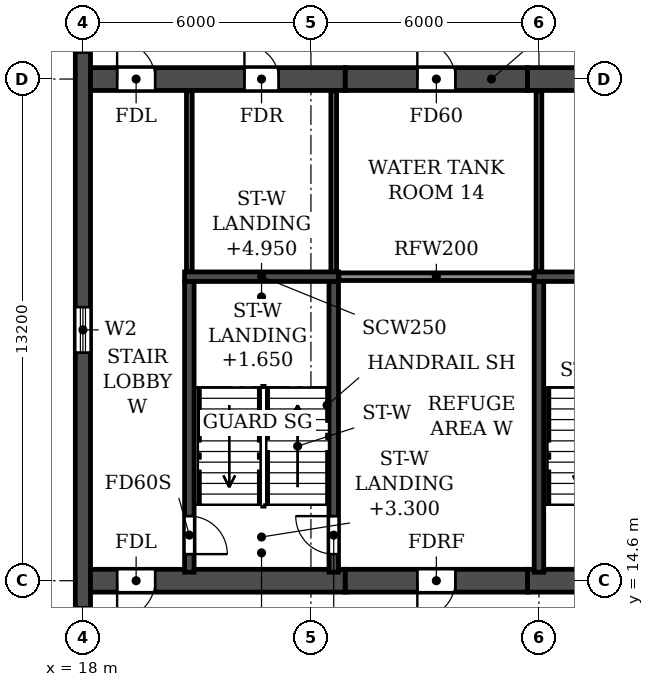
"""IFC4 building model, lengths in metres.
Left out: names, types, materials, properties, quantities, classifications, styles, units other than length and angle.
Written with IfcOpenShell. Run it as: python <this file> out.ifc"""

import sys

from ifc_helpers import new_model, si_unit, direction, frame, frame_2d, origin, place, context, subcontext, project, spatial, rectangle, extrude, element, fill, save


model = new_model("IFC4")
c1 = context("Model", 3, precision=1e-05, world=origin(), true_north=direction((0.0, 1.0)))
c2 = subcontext(c1, "Body", "Model", "MODEL_VIEW")
j1 = project(units=[si_unit("LENGTHUNIT", "METRE"), si_unit("PLANEANGLEUNIT", "RADIAN")], contexts=[c1])
p1 = place(None, origin())
s1 = spatial("IfcSite", under=j1, at=p1, CompositionType="ELEMENT")
p2 = place(p1, origin())
s2 = spatial("IfcBuilding", under=s1, at=p2, CompositionType="ELEMENT")
p3 = place(p2, frame((0.0, 0.0, 165.3)))
s3 = spatial("IfcBuildingStorey", under=s2, at=p3, CompositionType="ELEMENT", Elevation=165.3)
p4 = place(p3, frame((18.0, 4.683, 0.0), z_axis=(0.0, 0.0, 1.0), x_axis=(0.0, 1.0, 0.0)))
e1 = element("IfcWall", 1, at=p4, inside=s3, PredefinedType="SHEAR", context=c2, shape_type="SweptSolid", body=[
    extrude(rectangle(XDim=33.034, YDim=0.4, at=frame_2d((16.517, 0.0))), origin(), (0.0, 0.0, 1.0), 6.38),
])
p5 = place(p4, frame((23.817, 0.0, 0.9)))
e2 = element("IfcOpeningElement", 2, at=p5, cuts=e1, PredefinedType="OPENING", context=c2, shape_type="SweptSolid", body=[
    extrude(rectangle(XDim=1.2, YDim=1.5, at=frame_2d((0.6, 0.75))), frame((0.0, 0.21, 0.0), z_axis=(0.0, -1.0, 0.0), x_axis=(1.0, 0.0, 0.0)), (0.0, 0.0, 1.0), 0.42),
])
p6 = place(p4, frame((8.017, 0.0, 0.9)))
e3 = element("IfcOpeningElement", 3, at=p6, cuts=e1, PredefinedType="OPENING", context=c2, shape_type="SweptSolid", body=[
    extrude(rectangle(XDim=1.2, YDim=1.5, at=frame_2d((0.6, 0.75))), frame((0.0, 0.21, 0.0), z_axis=(0.0, -1.0, 0.0), x_axis=(1.0, 0.0, 0.0)), (0.0, 0.0, 1.0), 0.42),
])
p7 = place(p4, frame((15.917, 0.0, 0.9)))
e4 = element("IfcOpeningElement", 4, at=p7, cuts=e1, PredefinedType="OPENING", context=c2, shape_type="SweptSolid", body=[
    extrude(rectangle(XDim=1.2, YDim=1.5, at=frame_2d((0.6, 0.75))), frame((0.0, 0.21, 0.0), z_axis=(0.0, -1.0, 0.0), x_axis=(1.0, 0.0, 0.0)), (0.0, 0.0, 1.0), 0.42),
])
p8 = place(p3, frame((24.9, 14.6, 0.0), z_axis=(0.0, 0.0, 1.0), x_axis=(1.0, 0.0, 0.0)))
e5 = element("IfcWall", 5, at=p8, inside=s3, PredefinedType="SHEAR", context=c2, shape_type="SweptSolid", body=[
    extrude(rectangle(XDim=4.8, YDim=0.6, at=frame_2d((2.4, 0.0))), origin(), (0.0, 0.0, 1.0), 6.38),
])
p9 = place(p8, frame((1.9, 0.0, 0.0)))
e6 = element("IfcOpeningElement", 6, at=p9, cuts=e5, PredefinedType="OPENING", context=c2, shape_type="SweptSolid", body=[
    extrude(rectangle(XDim=1.0, YDim=2.1, at=frame_2d((0.5, 1.05))), frame((0.0, 0.31, 0.0), z_axis=(0.0, -1.0, 0.0), x_axis=(1.0, 0.0, 0.0)), (0.0, 0.0, 1.0), 0.62),
])
p10 = place(p3, frame((24.9, 27.8, 0.0), z_axis=(0.0, 0.0, 1.0), x_axis=(1.0, 0.0, 0.0)))
e7 = element("IfcWall", 7, at=p10, inside=s3, PredefinedType="SHEAR", context=c2, shape_type="SweptSolid", body=[
    extrude(rectangle(XDim=4.8, YDim=0.6, at=frame_2d((2.4, 0.0))), origin(), (0.0, 0.0, 1.0), 6.38),
])
p11 = place(p10, frame((1.9, 0.0, 0.0)))
e8 = element("IfcOpeningElement", 8, at=p11, cuts=e7, PredefinedType="OPENING", context=c2, shape_type="SweptSolid", body=[
    extrude(rectangle(XDim=1.0, YDim=2.1, at=frame_2d((0.5, 1.05))), frame((0.0, 0.31, 0.0), z_axis=(0.0, -1.0, 0.0), x_axis=(1.0, 0.0, 0.0)), (0.0, 0.0, 1.0), 0.62),
])
p12 = place(p3, frame((18.2, 14.6, 0.0), z_axis=(0.0, 0.0, 1.0), x_axis=(1.0, 0.0, 0.0)))
e9 = element("IfcWall", 9, at=p12, inside=s3, PredefinedType="SOLIDWALL", context=c2, shape_type="SweptSolid", body=[
    extrude(rectangle(XDim=6.7, YDim=0.6, at=frame_2d((3.35, 0.0))), origin(), (0.0, 0.0, 1.0), 6.38),
])
p13 = place(p12, frame((0.7, 0.0, 0.0)))
e10 = element("IfcOpeningElement", 10, at=p13, cuts=e9, PredefinedType="OPENING", context=c2, shape_type="SweptSolid", body=[
    extrude(rectangle(XDim=1.0, YDim=2.1, at=frame_2d((0.5, 1.05))), frame((0.0, 0.31, 0.0), z_axis=(0.0, -1.0, 0.0), x_axis=(1.0, 0.0, 0.0)), (0.0, 0.0, 1.0), 0.62),
])
p14 = place(p3, frame((29.7, 14.6, 0.0), z_axis=(0.0, 0.0, 1.0), x_axis=(1.0, 0.0, 0.0)))
e11 = element("IfcWall", 11, at=p14, inside=s3, PredefinedType="SOLIDWALL", context=c2, shape_type="SweptSolid", body=[
    extrude(rectangle(XDim=42.6, YDim=0.6, at=frame_2d((21.3, 0.0))), origin(), (0.0, 0.0, 1.0), 6.38),
])
p15 = place(p14, frame((1.7, 0.0, 0.0)))
e12 = element("IfcOpeningElement", 12, at=p15, cuts=e11, PredefinedType="OPENING", context=c2, shape_type="SweptSolid", body=[
    extrude(rectangle(XDim=1.0, YDim=2.1, at=frame_2d((0.5, 1.05))), frame((0.0, 0.31, 0.0), z_axis=(0.0, -1.0, 0.0), x_axis=(1.0, 0.0, 0.0)), (0.0, 0.0, 1.0), 0.62),
])
p16 = place(p14, frame((13.0, 0.0, 0.0)))
e13 = element("IfcOpeningElement", 13, at=p16, cuts=e11, PredefinedType="OPENING", context=c2, shape_type="SweptSolid", body=[
    extrude(rectangle(XDim=1.0, YDim=2.1, at=frame_2d((0.5, 1.05))), frame((0.0, 0.31, 0.0), z_axis=(0.0, -1.0, 0.0), x_axis=(1.0, 0.0, 0.0)), (0.0, 0.0, 1.0), 0.62),
])
p17 = place(p14, frame((16.9, 0.0, 0.0)))
e14 = element("IfcOpeningElement", 14, at=p17, cuts=e11, PredefinedType="OPENING", context=c2, shape_type="SweptSolid", body=[
    extrude(rectangle(XDim=1.0, YDim=2.1, at=frame_2d((0.5, 1.05))), frame((0.0, 0.31, 0.0), z_axis=(0.0, -1.0, 0.0), x_axis=(1.0, 0.0, 0.0)), (0.0, 0.0, 1.0), 0.62),
])
p18 = place(p14, frame((20.8, 0.0, 0.0)))
e15 = element("IfcOpeningElement", 15, at=p18, cuts=e11, PredefinedType="OPENING", context=c2, shape_type="SweptSolid", body=[
    extrude(rectangle(XDim=1.0, YDim=2.1, at=frame_2d((0.5, 1.05))), frame((0.0, 0.31, 0.0), z_axis=(0.0, -1.0, 0.0), x_axis=(1.0, 0.0, 0.0)), (0.0, 0.0, 1.0), 0.62),
])
p19 = place(p14, frame((24.7, 0.0, 0.0)))
e16 = element("IfcOpeningElement", 16, at=p19, cuts=e11, PredefinedType="OPENING", context=c2, shape_type="SweptSolid", body=[
    extrude(rectangle(XDim=1.0, YDim=2.1, at=frame_2d((0.5, 1.05))), frame((0.0, 0.31, 0.0), z_axis=(0.0, -1.0, 0.0), x_axis=(1.0, 0.0, 0.0)), (0.0, 0.0, 1.0), 0.62),
])
p20 = place(p14, frame((28.6, 0.0, 0.0)))
e17 = element("IfcOpeningElement", 17, at=p20, cuts=e11, PredefinedType="OPENING", context=c2, shape_type="SweptSolid", body=[
    extrude(rectangle(XDim=1.0, YDim=2.1, at=frame_2d((0.5, 1.05))), frame((0.0, 0.31, 0.0), z_axis=(0.0, -1.0, 0.0), x_axis=(1.0, 0.0, 0.0)), (0.0, 0.0, 1.0), 0.62),
])
p21 = place(p14, frame((39.9, 0.0, 0.0)))
e18 = element("IfcOpeningElement", 18, at=p21, cuts=e11, PredefinedType="OPENING", context=c2, shape_type="SweptSolid", body=[
    extrude(rectangle(XDim=1.0, YDim=2.1, at=frame_2d((0.5, 1.05))), frame((0.0, 0.31, 0.0), z_axis=(0.0, -1.0, 0.0), x_axis=(1.0, 0.0, 0.0)), (0.0, 0.0, 1.0), 0.62),
])
p22 = place(p3, frame((18.2, 27.8, 0.0), z_axis=(0.0, 0.0, 1.0), x_axis=(1.0, 0.0, 0.0)))
e19 = element("IfcWall", 19, at=p22, inside=s3, PredefinedType="SOLIDWALL", context=c2, shape_type="SweptSolid", body=[
    extrude(rectangle(XDim=6.7, YDim=0.6, at=frame_2d((3.35, 0.0))), origin(), (0.0, 0.0, 1.0), 6.38),
])
p23 = place(p22, frame((0.7, 0.0, 0.0)))
e20 = element("IfcOpeningElement", 20, at=p23, cuts=e19, PredefinedType="OPENING", context=c2, shape_type="SweptSolid", body=[
    extrude(rectangle(XDim=1.0, YDim=2.1, at=frame_2d((0.5, 1.05))), frame((0.0, 0.31, 0.0), z_axis=(0.0, -1.0, 0.0), x_axis=(1.0, 0.0, 0.0)), (0.0, 0.0, 1.0), 0.62),
])
p24 = place(p22, frame((4.05, 0.0, 0.0)))
e21 = element("IfcOpeningElement", 21, at=p24, cuts=e19, PredefinedType="OPENING", context=c2, shape_type="SweptSolid", body=[
    extrude(rectangle(XDim=0.9, YDim=2.1, at=frame_2d((0.45, 1.05))), frame((0.0, 0.31, 0.0), z_axis=(0.0, -1.0, 0.0), x_axis=(1.0, 0.0, 0.0)), (0.0, 0.0, 1.0), 0.62),
])
p25 = place(p3, frame((29.7, 27.8, 0.0), z_axis=(0.0, 0.0, 1.0), x_axis=(1.0, 0.0, 0.0)))
e22 = element("IfcWall", 22, at=p25, inside=s3, PredefinedType="SOLIDWALL", context=c2, shape_type="SweptSolid", body=[
    extrude(rectangle(XDim=42.6, YDim=0.6, at=frame_2d((21.3, 0.0))), origin(), (0.0, 0.0, 1.0), 6.38),
])
p26 = place(p25, frame((1.75, 0.0, 0.0)))
e23 = element("IfcOpeningElement", 23, at=p26, cuts=e22, PredefinedType="OPENING", context=c2, shape_type="SweptSolid", body=[
    extrude(rectangle(XDim=0.9, YDim=2.1, at=frame_2d((0.45, 1.05))), frame((0.0, 0.31, 0.0), z_axis=(0.0, -1.0, 0.0), x_axis=(1.0, 0.0, 0.0)), (0.0, 0.0, 1.0), 0.62),
])
p27 = place(p25, frame((4.9, 0.0, 0.0)))
e24 = element("IfcOpeningElement", 24, at=p27, cuts=e22, PredefinedType="OPENING", context=c2, shape_type="SweptSolid", body=[
    extrude(rectangle(XDim=1.0, YDim=2.1, at=frame_2d((0.5, 1.05))), frame((0.0, 0.31, 0.0), z_axis=(0.0, -1.0, 0.0), x_axis=(1.0, 0.0, 0.0)), (0.0, 0.0, 1.0), 0.62),
])
p28 = place(p25, frame((10.1, 0.0, 0.0)))
e25 = element("IfcOpeningElement", 25, at=p28, cuts=e22, PredefinedType="OPENING", context=c2, shape_type="SweptSolid", body=[
    extrude(rectangle(XDim=1.0, YDim=2.1, at=frame_2d((0.5, 1.05))), frame((0.0, 0.31, 0.0), z_axis=(0.0, -1.0, 0.0), x_axis=(1.0, 0.0, 0.0)), (0.0, 0.0, 1.0), 0.62),
])
p29 = place(p25, frame((17.9, 0.0, 0.0)))
e26 = element("IfcOpeningElement", 26, at=p29, cuts=e22, PredefinedType="OPENING", context=c2, shape_type="SweptSolid", body=[
    extrude(rectangle(XDim=1.0, YDim=2.1, at=frame_2d((0.5, 1.05))), frame((0.0, 0.31, 0.0), z_axis=(0.0, -1.0, 0.0), x_axis=(1.0, 0.0, 0.0)), (0.0, 0.0, 1.0), 0.62),
])
p30 = place(p25, frame((20.8, 0.0, 0.0)))
e27 = element("IfcOpeningElement", 27, at=p30, cuts=e22, PredefinedType="OPENING", context=c2, shape_type="SweptSolid", body=[
    extrude(rectangle(XDim=1.0, YDim=2.1, at=frame_2d((0.5, 1.05))), frame((0.0, 0.31, 0.0), z_axis=(0.0, -1.0, 0.0), x_axis=(1.0, 0.0, 0.0)), (0.0, 0.0, 1.0), 0.62),
])
p31 = place(p25, frame((23.7, 0.0, 0.0)))
e28 = element("IfcOpeningElement", 28, at=p31, cuts=e22, PredefinedType="OPENING", context=c2, shape_type="SweptSolid", body=[
    extrude(rectangle(XDim=1.0, YDim=2.1, at=frame_2d((0.5, 1.05))), frame((0.0, 0.31, 0.0), z_axis=(0.0, -1.0, 0.0), x_axis=(1.0, 0.0, 0.0)), (0.0, 0.0, 1.0), 0.62),
])
p32 = place(p25, frame((26.3, 0.0, 0.0)))
e29 = element("IfcOpeningElement", 29, at=p32, cuts=e22, PredefinedType="OPENING", context=c2, shape_type="SweptSolid", body=[
    extrude(rectangle(XDim=1.0, YDim=2.1, at=frame_2d((0.5, 1.05))), frame((0.0, 0.31, 0.0), z_axis=(0.0, -1.0, 0.0), x_axis=(1.0, 0.0, 0.0)), (0.0, 0.0, 1.0), 0.62),
])
p33 = place(p25, frame((28.9, 0.0, 0.0)))
e30 = element("IfcOpeningElement", 30, at=p33, cuts=e22, PredefinedType="OPENING", context=c2, shape_type="SweptSolid", body=[
    extrude(rectangle(XDim=1.0, YDim=2.1, at=frame_2d((0.5, 1.05))), frame((0.0, 0.31, 0.0), z_axis=(0.0, -1.0, 0.0), x_axis=(1.0, 0.0, 0.0)), (0.0, 0.0, 1.0), 0.62),
])
p34 = place(p25, frame((31.5, 0.0, 0.0)))
e31 = element("IfcOpeningElement", 31, at=p34, cuts=e22, PredefinedType="OPENING", context=c2, shape_type="SweptSolid", body=[
    extrude(rectangle(XDim=1.0, YDim=2.1, at=frame_2d((0.5, 1.05))), frame((0.0, 0.31, 0.0), z_axis=(0.0, -1.0, 0.0), x_axis=(1.0, 0.0, 0.0)), (0.0, 0.0, 1.0), 0.62),
])
p35 = place(p25, frame((34.1, 0.0, 0.0)))
e32 = element("IfcOpeningElement", 32, at=p35, cuts=e22, PredefinedType="OPENING", context=c2, shape_type="SweptSolid", body=[
    extrude(rectangle(XDim=1.0, YDim=2.1, at=frame_2d((0.5, 1.05))), frame((0.0, 0.31, 0.0), z_axis=(0.0, -1.0, 0.0), x_axis=(1.0, 0.0, 0.0)), (0.0, 0.0, 1.0), 0.62),
])
p36 = place(p25, frame((36.7, 0.0, 0.0)))
e33 = element("IfcOpeningElement", 33, at=p36, cuts=e22, PredefinedType="OPENING", context=c2, shape_type="SweptSolid", body=[
    extrude(rectangle(XDim=1.0, YDim=2.1, at=frame_2d((0.5, 1.05))), frame((0.0, 0.31, 0.0), z_axis=(0.0, -1.0, 0.0), x_axis=(1.0, 0.0, 0.0)), (0.0, 0.0, 1.0), 0.62),
])
p37 = place(p25, frame((39.95, 0.0, 0.0)))
e34 = element("IfcOpeningElement", 34, at=p37, cuts=e22, PredefinedType="OPENING", context=c2, shape_type="SweptSolid", body=[
    extrude(rectangle(XDim=0.9, YDim=2.1, at=frame_2d((0.45, 1.05))), frame((0.0, 0.31, 0.0), z_axis=(0.0, -1.0, 0.0), x_axis=(1.0, 0.0, 0.0)), (0.0, 0.0, 1.0), 0.62),
])
p38 = place(p3, frame((30.0, 14.825, 0.0), z_axis=(0.0, 0.0, 1.0), x_axis=(0.0, 1.0, 0.0)))
e35 = element("IfcWall", 35, at=p38, inside=s3, PredefinedType="SOLIDWALL", context=c2, shape_type="SweptSolid", body=[
    extrude(rectangle(XDim=7.65, YDim=0.25, at=frame_2d((3.825, 0.0))), origin(), (0.0, 0.0, 1.0), 6.38),
])
p39 = place(p3, frame((29.875, 22.6, 0.0), z_axis=(0.0, 0.0, 1.0), x_axis=(1.0, 0.0, 0.0)))
e36 = element("IfcWall", 36, at=p39, inside=s3, PredefinedType="SOLIDWALL", context=c2, shape_type="SweptSolid", body=[
    extrude(rectangle(XDim=4.05, YDim=0.25, at=frame_2d((2.025, 0.0))), origin(), (0.0, 0.0, 1.0), 6.38),
])
p40 = place(p3, frame((20.8, 14.825, 0.0), z_axis=(0.0, 0.0, 1.0), x_axis=(0.0, 1.0, 0.0)))
e37 = element("IfcWall", 37, at=p40, inside=s3, PredefinedType="SOLIDWALL", context=c2, shape_type="SweptSolid", body=[
    extrude(rectangle(XDim=7.65, YDim=0.25, at=frame_2d((3.825, 0.0))), origin(), (0.0, 0.0, 1.0), 6.38),
])
p41 = place(p40, frame((0.475, 0.0, 0.0)))
e38 = element("IfcOpeningElement", 38, at=p41, cuts=e37, PredefinedType="OPENING", context=c2, shape_type="SweptSolid", body=[
    extrude(rectangle(XDim=1.0, YDim=2.1, at=frame_2d((0.5, 1.05))), frame((0.0, 0.135, 0.0), z_axis=(0.0, -1.0, 0.0), x_axis=(1.0, 0.0, 0.0)), (0.0, 0.0, 1.0), 0.27),
])
p42 = place(p3, frame((24.6, 14.825, 0.0), z_axis=(0.0, 0.0, 1.0), x_axis=(0.0, 1.0, 0.0)))
e39 = element("IfcWall", 39, at=p42, inside=s3, PredefinedType="SOLIDWALL", context=c2, shape_type="SweptSolid", body=[
    extrude(rectangle(XDim=7.65, YDim=0.25, at=frame_2d((3.825, 0.0))), origin(), (0.0, 0.0, 1.0), 6.38),
])
p43 = place(p42, frame((0.475, 0.0, 0.0)))
e40 = element("IfcOpeningElement", 40, at=p43, cuts=e39, PredefinedType="OPENING", context=c2, shape_type="SweptSolid", body=[
    extrude(rectangle(XDim=1.0, YDim=2.1, at=frame_2d((0.5, 1.05))), frame((0.0, 0.135, 0.0), z_axis=(0.0, -1.0, 0.0), x_axis=(1.0, 0.0, 0.0)), (0.0, 0.0, 1.0), 0.27),
])
p44 = place(p3, frame((20.675, 22.6, 0.0), z_axis=(0.0, 0.0, 1.0), x_axis=(1.0, 0.0, 0.0)))
e41 = element("IfcWall", 41, at=p44, inside=s3, PredefinedType="SOLIDWALL", context=c2, shape_type="SweptSolid", body=[
    extrude(rectangle(XDim=4.05, YDim=0.25, at=frame_2d((2.025, 0.0))), origin(), (0.0, 0.0, 1.0), 6.38),
])
p45 = place(p3, frame((24.735, 22.6, 0.0), z_axis=(0.0, 0.0, 1.0), x_axis=(1.0, 0.0, 0.0)))
e42 = element("IfcWall", 42, at=p45, inside=s3, PredefinedType="PARTITIONING", context=c2, shape_type="SweptSolid", body=[
    extrude(rectangle(XDim=5.13, YDim=0.2, at=frame_2d((2.565, 0.0))), origin(), (0.0, 0.0, 1.0), 6.38),
])
for number, where, z_axis, x_axis in (
    (43, (20.8, 22.735, 0.0), (0.0, 0.0, 1.0), (0.0, 1.0, 0.0)),
    (44, (24.6, 22.735, 0.0), (0.0, 0.0, 1.0), (0.0, 1.0, 0.0)),
    (45, (30.0, 22.735, 0.0), (0.0, 0.0, 1.0), (0.0, 1.0, 0.0)),
):
    element("IfcWall", number, at=place(p3, frame(where, z_axis=z_axis, x_axis=x_axis)), inside=s3, PredefinedType="PARTITIONING", context=c2, shape_type="SweptSolid", body=[
        extrude(rectangle(XDim=4.755, YDim=0.15, at=frame_2d((2.377, 0.0))), origin(), (0.0, 0.0, 1.0), 6.38),
    ])
p46 = place(p6, origin())
e46 = element("IfcWindow", 46, at=p46, inside=s3, PartitioningType="SINGLE_PANEL", PredefinedType="WINDOW", context=c2, shape_type="SweptSolid", body=[
    extrude(rectangle(XDim=1.2, YDim=1.5, at=frame_2d((0.6, 0.75))), frame((0.0, 0.03, 0.0), z_axis=(0.0, -1.0, 0.0), x_axis=(1.0, 0.0, 0.0)), (0.0, 0.0, 1.0), 0.06),
])
fill(e3, e46)
p47 = place(p7, origin())
e47 = element("IfcWindow", 47, at=p47, inside=s3, PartitioningType="SINGLE_PANEL", PredefinedType="WINDOW", context=c2, shape_type="SweptSolid", body=[
    extrude(rectangle(XDim=1.2, YDim=1.5, at=frame_2d((0.6, 0.75))), frame((0.0, 0.03, 0.0), z_axis=(0.0, -1.0, 0.0), x_axis=(1.0, 0.0, 0.0)), (0.0, 0.0, 1.0), 0.06),
])
fill(e4, e47)
p48 = place(p23, origin())
e48 = element("IfcDoor", 48, at=p48, inside=s3, OperationType="SINGLE_SWING_LEFT", PredefinedType="DOOR", context=c2, shape_type="SweptSolid", body=[
    extrude(rectangle(XDim=1.0, YDim=2.1, at=frame_2d((0.5, 1.05))), frame((0.0, 0.025, 0.0), z_axis=(0.0, -1.0, 0.0), x_axis=(1.0, 0.0, 0.0)), (0.0, 0.0, 1.0), 0.05),
])
fill(e20, e48)
p49 = place(p24, origin())
e49 = element("IfcDoor", 49, at=p49, inside=s3, OperationType="SINGLE_SWING_LEFT", PredefinedType="DOOR", context=c2, shape_type="SweptSolid", body=[
    extrude(rectangle(XDim=0.9, YDim=2.1, at=frame_2d((0.45, 1.05))), frame((0.0, 0.025, 0.0), z_axis=(0.0, -1.0, 0.0), x_axis=(1.0, 0.0, 0.0)), (0.0, 0.0, 1.0), 0.05),
])
fill(e21, e49)
p50 = place(p11, origin())
e50 = element("IfcDoor", 50, at=p50, inside=s3, OperationType="SINGLE_SWING_LEFT", PredefinedType="DOOR", context=c2, shape_type="SweptSolid", body=[
    extrude(rectangle(XDim=1.0, YDim=2.1, at=frame_2d((0.5, 1.05))), frame((0.0, 0.025, 0.0), z_axis=(0.0, -1.0, 0.0), x_axis=(1.0, 0.0, 0.0)), (0.0, 0.0, 1.0), 0.05),
])
fill(e8, e50)
p51 = place(p13, frame((1.0, 0.0, 0.0), z_axis=(0.0, 0.0, 1.0), x_axis=(-1.0, 0.0, 0.0)))
e51 = element("IfcDoor", 51, at=p51, inside=s3, OperationType="SINGLE_SWING_RIGHT", PredefinedType="DOOR", context=c2, shape_type="SweptSolid", body=[
    extrude(rectangle(XDim=1.0, YDim=2.1, at=frame_2d((0.5, 1.05))), frame((0.0, 0.025, 0.0), z_axis=(0.0, -1.0, 0.0), x_axis=(1.0, 0.0, 0.0)), (0.0, 0.0, 1.0), 0.05),
])
fill(e10, e51)
p52 = place(p9, frame((1.0, 0.0, 0.0), z_axis=(0.0, 0.0, 1.0), x_axis=(-1.0, 0.0, 0.0)))
e52 = element("IfcDoor", 52, at=p52, inside=s3, OperationType="SINGLE_SWING_RIGHT", PredefinedType="DOOR", context=c2, shape_type="SweptSolid", body=[
    extrude(rectangle(XDim=1.0, YDim=2.1, at=frame_2d((0.5, 1.05))), frame((0.0, 0.025, 0.0), z_axis=(0.0, -1.0, 0.0), x_axis=(1.0, 0.0, 0.0)), (0.0, 0.0, 1.0), 0.05),
])
fill(e6, e52)
p53 = place(p43, origin())
e53 = element("IfcDoor", 53, at=p53, inside=s3, OperationType="SINGLE_SWING_RIGHT", PredefinedType="DOOR", context=c2, shape_type="SweptSolid", body=[
    extrude(rectangle(XDim=1.0, YDim=2.1, at=frame_2d((0.5, 1.05))), frame((0.0, 0.025, 0.0), z_axis=(0.0, -1.0, 0.0), x_axis=(1.0, 0.0, 0.0)), (0.0, 0.0, 1.0), 0.05),
])
fill(e40, e53)
p54 = place(p41, frame((1.0, 0.0, 0.0), z_axis=(0.0, 0.0, 1.0), x_axis=(-1.0, 0.0, 0.0)))
e54 = element("IfcDoor", 54, at=p54, inside=s3, OperationType="SINGLE_SWING_RIGHT", PredefinedType="DOOR", context=c2, shape_type="SweptSolid", body=[
    extrude(rectangle(XDim=1.0, YDim=2.1, at=frame_2d((0.5, 1.05))), frame((0.0, 0.025, 0.0), z_axis=(0.0, -1.0, 0.0), x_axis=(1.0, 0.0, 0.0)), (0.0, 0.0, 1.0), 0.05),
])
fill(e38, e54)
save(model, sys.argv[1])
